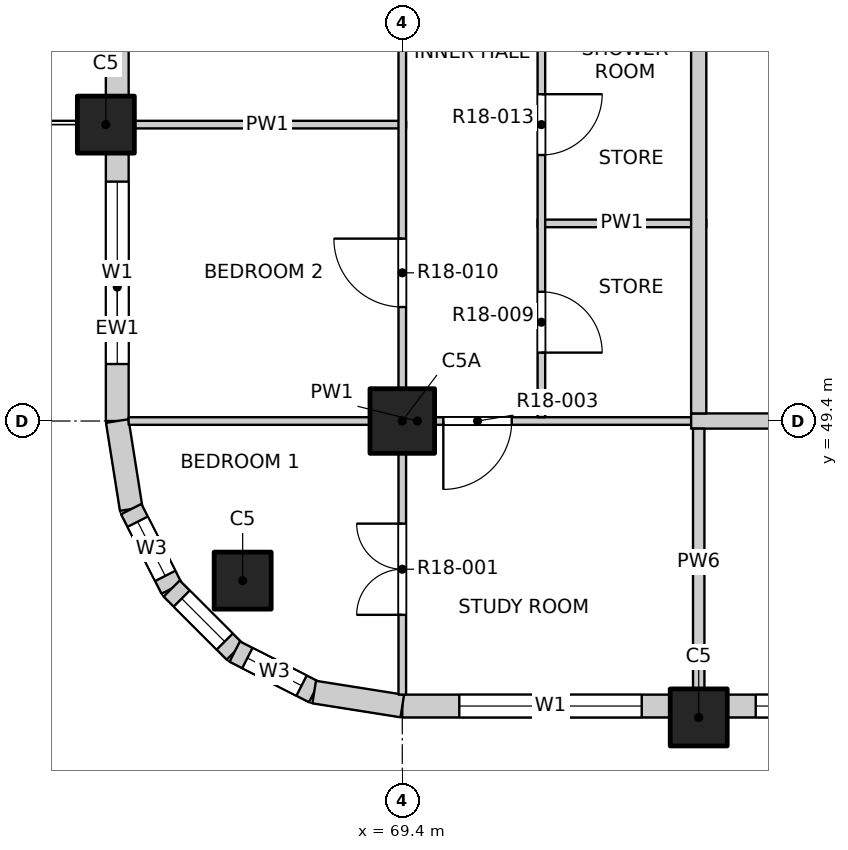
"""IFC4 building model, lengths in metres.
Left out: names, types, materials, properties, quantities, classifications, styles, units other than length and angle.
Written with IfcOpenShell. Run it as: python <this file> out.ifc"""

import sys

from ifc_helpers import new_model, si_unit, direction, frame, frame_2d, origin, origin_2d, place, context, subcontext, project, spatial, rectangle, extrude, element, fill, save


model = new_model("IFC4")
c1 = context("Model", 3, precision=1e-05, world=origin(), true_north=direction((0.0, 1.0)))
c2 = subcontext(c1, "Body", "Model", "MODEL_VIEW")
j1 = project(units=[si_unit("LENGTHUNIT", "METRE"), si_unit("PLANEANGLEUNIT", "RADIAN")], contexts=[c1])
p1 = place(None, origin())
s1 = spatial("IfcSite", under=j1, at=p1, CompositionType="ELEMENT")
p2 = place(p1, origin())
s2 = spatial("IfcBuilding", under=s1, at=p2, CompositionType="ELEMENT")
p3 = place(p2, frame((0.0, 0.0, 189.4)))
s3 = spatial("IfcBuildingStorey", under=s2, at=p3, CompositionType="ELEMENT", Elevation=189.4)
for number, where, z_axis, x_axis in (
    (1, (67.3, 47.3, -0.25), (0.0, 0.0, 1.0), (1.0, 0.0, 0.0)),
    (2, (65.5, 53.3, -0.25), (0.0, 0.0, 1.0), (1.0, 0.0, 0.0)),
    (3, (73.3, 45.5, -0.25), (0.0, 0.0, 1.0), (1.0, 0.0, 0.0)),
):
    element("IfcColumn", number, at=place(p3, frame(where, z_axis=z_axis, x_axis=x_axis)), inside=s3, PredefinedType="COLUMN", context=c2, shape_type="SweptSolid", body=[
        extrude(rectangle(XDim=0.75, YDim=0.75, at=origin_2d()), origin(), (0.0, 0.0, 1.0), 3.35),
    ])
p4 = place(p3, frame((69.4, 49.4, -0.25), z_axis=(0.0, 0.0, 1.0), x_axis=(1.0, 0.0, 0.0)))
e4 = element("IfcColumn", 4, at=p4, inside=s3, PredefinedType="COLUMN", context=c2, shape_type="SweptSolid", body=[
    extrude(rectangle(XDim=0.85, YDim=0.85, at=origin_2d()), origin(), (0.0, 0.0, 1.0), 3.35),
])
p5 = place(p3, frame((69.4, 45.65, 0.0), z_axis=(0.0, 0.0, 1.0), x_axis=(1.0, 0.0, 0.0)))
e5 = element("IfcWall", 5, at=p5, inside=s3, PredefinedType="SOLIDWALL", context=c2, shape_type="SweptSolid", body=[
    extrude(rectangle(XDim=3.525, YDim=0.3, at=frame_2d((1.763, 0.0))), origin(), (0.0, 0.0, 1.0), 3.1),
])
p6 = place(p5, frame((0.75, 0.0, 0.9)))
e6 = element("IfcOpeningElement", 6, at=p6, cuts=e5, PredefinedType="OPENING", context=c2, shape_type="SweptSolid", body=[
    extrude(rectangle(XDim=2.4, YDim=1.8, at=frame_2d((1.2, 0.9))), frame((0.0, 0.16, 0.0), z_axis=(0.0, -1.0, 0.0), x_axis=(1.0, 0.0, 0.0)), (0.0, 0.0, 1.0), 0.32),
])
p7 = place(p3, frame((73.675, 45.65, 0.0), z_axis=(0.0, 0.0, 1.0), x_axis=(1.0, 0.0, 0.0)))
e7 = element("IfcWall", 7, at=p7, inside=s3, PredefinedType="SOLIDWALL", context=c2, shape_type="SweptSolid", body=[
    extrude(rectangle(XDim=7.05, YDim=0.3, at=frame_2d((3.525, 0.0))), origin(), (0.0, 0.0, 1.0), 3.1),
])
p8 = place(p7, frame((0.375, 0.0, 0.9)))
e8 = element("IfcOpeningElement", 8, at=p8, cuts=e7, PredefinedType="OPENING", context=c2, shape_type="SweptSolid", body=[
    extrude(rectangle(XDim=2.4, YDim=1.8, at=frame_2d((1.2, 0.9))), frame((0.0, 0.16, 0.0), z_axis=(0.0, -1.0, 0.0), x_axis=(1.0, 0.0, 0.0)), (0.0, 0.0, 1.0), 0.32),
])
p9 = place(p7, frame((4.275, 0.0, 0.9)))
e9 = element("IfcOpeningElement", 9, at=p9, cuts=e7, PredefinedType="OPENING", context=c2, shape_type="SweptSolid", body=[
    extrude(rectangle(XDim=2.4, YDim=1.8, at=frame_2d((1.2, 0.9))), frame((0.0, 0.16, 0.0), z_axis=(0.0, -1.0, 0.0), x_axis=(1.0, 0.0, 0.0)), (0.0, 0.0, 1.0), 0.32),
])
p10 = place(p3, frame((65.65, 49.4, 0.0), z_axis=(0.0, 0.0, 1.0), x_axis=(0.0, 1.0, 0.0)))
e10 = element("IfcWall", 10, at=p10, inside=s3, PredefinedType="SOLIDWALL", context=c2, shape_type="SweptSolid", body=[
    extrude(rectangle(XDim=3.525, YDim=0.3, at=frame_2d((1.763, 0.0))), origin(), (0.0, 0.0, 1.0), 3.1),
])
p11 = place(p10, frame((0.75, 0.0, 0.9)))
e11 = element("IfcOpeningElement", 11, at=p11, cuts=e10, PredefinedType="OPENING", context=c2, shape_type="SweptSolid", body=[
    extrude(rectangle(XDim=2.4, YDim=1.8, at=frame_2d((1.2, 0.9))), frame((0.0, 0.16, 0.0), z_axis=(0.0, -1.0, 0.0), x_axis=(1.0, 0.0, 0.0)), (0.0, 0.0, 1.0), 0.32),
])
p12 = place(p3, frame((65.65, 53.675, 0.0), z_axis=(0.0, 0.0, 1.0), x_axis=(0.0, 1.0, 0.0)))
e12 = element("IfcWall", 12, at=p12, inside=s3, PredefinedType="SOLIDWALL", context=c2, shape_type="SweptSolid", body=[
    extrude(rectangle(XDim=7.05, YDim=0.3, at=frame_2d((3.525, 0.0))), origin(), (0.0, 0.0, 1.0), 3.1),
])
p13 = place(p12, frame((0.675, 0.0, 0.0)))
e13 = element("IfcOpeningElement", 13, at=p13, cuts=e12, PredefinedType="OPENING", context=c2, shape_type="SweptSolid", body=[
    extrude(rectangle(XDim=1.8, YDim=2.4, at=frame_2d((0.9, 1.2))), frame((0.0, 0.16, 0.0), z_axis=(0.0, -1.0, 0.0), x_axis=(1.0, 0.0, 0.0)), (0.0, 0.0, 1.0), 0.32),
])
p14 = place(p12, frame((4.275, 0.0, 0.9)))
e14 = element("IfcOpeningElement", 14, at=p14, cuts=e12, PredefinedType="OPENING", context=c2, shape_type="SweptSolid", body=[
    extrude(rectangle(XDim=2.4, YDim=1.8, at=frame_2d((1.2, 0.9))), frame((0.0, 0.16, 0.0), z_axis=(0.0, -1.0, 0.0), x_axis=(1.0, 0.0, 0.0)), (0.0, 0.0, 1.0), 0.32),
])
p15 = place(p3, frame((65.65, 49.4, 0.0), z_axis=(0.0, 0.0, 1.0), x_axis=(0.156496880861, -0.987678452879, 0.0)))
e15 = element("IfcWall", 15, at=p15, inside=s3, PredefinedType="SOLIDWALL", context=c2, shape_type="SweptSolid", body=[
    extrude(rectangle(XDim=1.173, YDim=0.3, at=frame_2d((0.586, 0.0))), origin(), (0.0, 0.0, 1.0), 3.1),
])
p16 = place(p3, frame((65.833, 48.241, 0.0), z_axis=(0.0, 0.0, 1.0), x_axis=(0.454025524128, -0.890988677504, 0.0)))
e16 = element("IfcWall", 16, at=p16, inside=s3, PredefinedType="SOLIDWALL", context=c2, shape_type="SweptSolid", body=[
    extrude(rectangle(XDim=1.173, YDim=0.3, at=frame_2d((0.587, 0.0))), origin(), (0.0, 0.0, 1.0), 3.1),
])
p17 = place(p16, frame((0.187, 0.0, 0.9)))
e17 = element("IfcOpeningElement", 17, at=p17, cuts=e16, PredefinedType="OPENING", context=c2, shape_type="SweptSolid", body=[
    extrude(rectangle(XDim=0.8, YDim=1.2, at=frame_2d((0.4, 0.6))), frame((0.0, 0.16, 0.0), z_axis=(0.0, -1.0, 0.0), x_axis=(1.0, 0.0, 0.0)), (0.0, 0.0, 1.0), 0.32),
])
p18 = place(p3, frame((66.366, 47.196, 0.0), z_axis=(0.0, 0.0, 1.0), x_axis=(0.707106781187, -0.707106781187, 0.0)))
e18 = element("IfcWall", 18, at=p18, inside=s3, PredefinedType="SOLIDWALL", context=c2, shape_type="SweptSolid", body=[
    extrude(rectangle(XDim=1.173, YDim=0.3, at=frame_2d((0.586, 0.0))), origin(), (0.0, 0.0, 1.0), 3.1),
])
p19 = place(p18, frame((0.187, 0.0, 0.9)))
e19 = element("IfcOpeningElement", 19, at=p19, cuts=e18, PredefinedType="OPENING", context=c2, shape_type="SweptSolid", body=[
    extrude(rectangle(XDim=0.8, YDim=1.2, at=frame_2d((0.4, 0.6))), frame((0.0, 0.16, 0.0), z_axis=(0.0, -1.0, 0.0), x_axis=(1.0, 0.0, 0.0)), (0.0, 0.0, 1.0), 0.32),
])
p20 = place(p3, frame((67.196, 46.366, 0.0), z_axis=(0.0, 0.0, 1.0), x_axis=(0.890988677504, -0.454025524128, 0.0)))
e20 = element("IfcWall", 20, at=p20, inside=s3, PredefinedType="SOLIDWALL", context=c2, shape_type="SweptSolid", body=[
    extrude(rectangle(XDim=1.173, YDim=0.3, at=frame_2d((0.587, 0.0))), origin(), (0.0, 0.0, 1.0), 3.1),
])
p21 = place(p20, frame((0.187, 0.0, 0.9)))
e21 = element("IfcOpeningElement", 21, at=p21, cuts=e20, PredefinedType="OPENING", context=c2, shape_type="SweptSolid", body=[
    extrude(rectangle(XDim=0.8, YDim=1.2, at=frame_2d((0.4, 0.6))), frame((0.0, 0.16, 0.0), z_axis=(0.0, -1.0, 0.0), x_axis=(1.0, 0.0, 0.0)), (0.0, 0.0, 1.0), 0.32),
])
p22 = place(p3, frame((68.241, 45.833, 0.0), z_axis=(0.0, 0.0, 1.0), x_axis=(0.987678452879, -0.156496880861, 0.0)))
e22 = element("IfcWall", 22, at=p22, inside=s3, PredefinedType="SOLIDWALL", context=c2, shape_type="SweptSolid", body=[
    extrude(rectangle(XDim=1.173, YDim=0.3, at=frame_2d((0.586, 0.0))), origin(), (0.0, 0.0, 1.0), 3.1),
])
p23 = place(p3, frame((65.8, 49.4, 0.0), z_axis=(0.0, 0.0, 1.0), x_axis=(1.0, 0.0, 0.0)))
e23 = element("IfcWall", 23, at=p23, inside=s3, PredefinedType="PARTITIONING", context=c2, shape_type="SweptSolid", body=[
    extrude(rectangle(XDim=7.6, YDim=0.1, at=frame_2d((3.8, 0.0))), origin(), (0.0, 0.0, 1.0), 3.1),
])
p24 = place(p23, frame((4.14, 0.0, 0.0)))
e24 = element("IfcOpeningElement", 24, at=p24, cuts=e23, PredefinedType="OPENING", context=c2, shape_type="SweptSolid", body=[
    extrude(rectangle(XDim=0.9, YDim=2.1, at=frame_2d((0.45, 1.05))), frame((0.0, 0.06, 0.0), z_axis=(0.0, -1.0, 0.0), x_axis=(1.0, 0.0, 0.0)), (0.0, 0.0, 1.0), 0.12),
])
p25 = place(p3, frame((73.2, 49.4, 0.0), z_axis=(0.0, 0.0, 1.0), x_axis=(1.0, 0.0, 0.0)))
e25 = element("IfcWall", 25, at=p25, inside=s3, PredefinedType="PARTITIONING", context=c2, shape_type="SweptSolid", body=[
    extrude(rectangle(XDim=23.6, YDim=0.2, at=frame_2d((11.8, 0.0))), origin(), (0.0, 0.0, 1.0), 3.1),
])
p26 = place(p25, frame((4.525, 0.0, 0.0)))
e26 = element("IfcOpeningElement", 26, at=p26, cuts=e25, PredefinedType="OPENING", context=c2, shape_type="SweptSolid", body=[
    extrude(rectangle(XDim=1.2, YDim=2.1, at=frame_2d((0.6, 1.05))), frame((0.0, 0.11, 0.0), z_axis=(0.0, -1.0, 0.0), x_axis=(1.0, 0.0, 0.0)), (0.0, 0.0, 1.0), 0.22),
])
p27 = place(p25, frame((12.325, 0.0, 0.0)))
e27 = element("IfcOpeningElement", 27, at=p27, cuts=e25, PredefinedType="OPENING", context=c2, shape_type="SweptSolid", body=[
    extrude(rectangle(XDim=1.2, YDim=2.1, at=frame_2d((0.6, 1.05))), frame((0.0, 0.11, 0.0), z_axis=(0.0, -1.0, 0.0), x_axis=(1.0, 0.0, 0.0)), (0.0, 0.0, 1.0), 0.22),
])
p28 = place(p25, frame((20.125, 0.0, 0.0)))
e28 = element("IfcOpeningElement", 28, at=p28, cuts=e25, PredefinedType="OPENING", context=c2, shape_type="SweptSolid", body=[
    extrude(rectangle(XDim=1.2, YDim=2.1, at=frame_2d((0.6, 1.05))), frame((0.0, 0.11, 0.0), z_axis=(0.0, -1.0, 0.0), x_axis=(1.0, 0.0, 0.0)), (0.0, 0.0, 1.0), 0.22),
])
p29 = place(p3, frame((71.18, 52.0, 0.0), z_axis=(0.0, 0.0, 1.0), x_axis=(1.0, 0.0, 0.0)))
e29 = element("IfcWall", 29, at=p29, inside=s3, PredefinedType="PARTITIONING", context=c2, shape_type="SweptSolid", body=[
    extrude(rectangle(XDim=2.22, YDim=0.1, at=frame_2d((1.11, 0.0))), origin(), (0.0, 0.0, 1.0), 3.1),
])
p30 = place(p3, frame((65.8, 53.3, 0.0), z_axis=(0.0, 0.0, 1.0), x_axis=(1.0, 0.0, 0.0)))
e30 = element("IfcWall", 30, at=p30, inside=s3, PredefinedType="PARTITIONING", context=c2, shape_type="SweptSolid", body=[
    extrude(rectangle(XDim=3.65, YDim=0.1, at=frame_2d((1.825, 0.0))), origin(), (0.0, 0.0, 1.0), 3.1),
])
p31 = place(p3, frame((69.4, 45.8, 0.0), z_axis=(0.0, 0.0, 1.0), x_axis=(0.0, 1.0, 0.0)))
e31 = element("IfcWall", 31, at=p31, inside=s3, PredefinedType="PARTITIONING", context=c2, shape_type="SweptSolid", body=[
    extrude(rectangle(XDim=38.4, YDim=0.1, at=frame_2d((19.2, 0.0))), origin(), (0.0, 0.0, 1.0), 3.1),
])
p32 = place(p31, frame((1.05, 0.0, 0.0)))
e32 = element("IfcOpeningElement", 32, at=p32, cuts=e31, PredefinedType="OPENING", context=c2, shape_type="SweptSolid", body=[
    extrude(rectangle(XDim=1.2, YDim=2.1, at=frame_2d((0.6, 1.05))), frame((0.0, 0.06, 0.0), z_axis=(0.0, -1.0, 0.0), x_axis=(1.0, 0.0, 0.0)), (0.0, 0.0, 1.0), 0.12),
])
p33 = place(p31, frame((5.1, 0.0, 0.0)))
e33 = element("IfcOpeningElement", 33, at=p33, cuts=e31, PredefinedType="OPENING", context=c2, shape_type="SweptSolid", body=[
    extrude(rectangle(XDim=0.9, YDim=2.1, at=frame_2d((0.45, 1.05))), frame((0.0, 0.06, 0.0), z_axis=(0.0, -1.0, 0.0), x_axis=(1.0, 0.0, 0.0)), (0.0, 0.0, 1.0), 0.12),
])
p34 = place(p31, frame((9.0, 0.0, 0.0)))
e34 = element("IfcOpeningElement", 34, at=p34, cuts=e31, PredefinedType="OPENING", context=c2, shape_type="SweptSolid", body=[
    extrude(rectangle(XDim=0.9, YDim=2.1, at=frame_2d((0.45, 1.05))), frame((0.0, 0.06, 0.0), z_axis=(0.0, -1.0, 0.0), x_axis=(1.0, 0.0, 0.0)), (0.0, 0.0, 1.0), 0.12),
])
p35 = place(p31, frame((12.9, 0.0, 0.0)))
e35 = element("IfcOpeningElement", 35, at=p35, cuts=e31, PredefinedType="OPENING", context=c2, shape_type="SweptSolid", body=[
    extrude(rectangle(XDim=0.9, YDim=2.1, at=frame_2d((0.45, 1.05))), frame((0.0, 0.06, 0.0), z_axis=(0.0, -1.0, 0.0), x_axis=(1.0, 0.0, 0.0)), (0.0, 0.0, 1.0), 0.12),
])
p36 = place(p31, frame((16.8, 0.0, 0.0)))
e36 = element("IfcOpeningElement", 36, at=p36, cuts=e31, PredefinedType="OPENING", context=c2, shape_type="SweptSolid", body=[
    extrude(rectangle(XDim=0.9, YDim=2.1, at=frame_2d((0.45, 1.05))), frame((0.0, 0.06, 0.0), z_axis=(0.0, -1.0, 0.0), x_axis=(1.0, 0.0, 0.0)), (0.0, 0.0, 1.0), 0.12),
])
p37 = place(p31, frame((20.7, 0.0, 0.0)))
e37 = element("IfcOpeningElement", 37, at=p37, cuts=e31, PredefinedType="OPENING", context=c2, shape_type="SweptSolid", body=[
    extrude(rectangle(XDim=0.9, YDim=2.1, at=frame_2d((0.45, 1.05))), frame((0.0, 0.06, 0.0), z_axis=(0.0, -1.0, 0.0), x_axis=(1.0, 0.0, 0.0)), (0.0, 0.0, 1.0), 0.12),
])
p38 = place(p31, frame((24.6, 0.0, 0.0)))
e38 = element("IfcOpeningElement", 38, at=p38, cuts=e31, PredefinedType="OPENING", context=c2, shape_type="SweptSolid", body=[
    extrude(rectangle(XDim=0.9, YDim=2.1, at=frame_2d((0.45, 1.05))), frame((0.0, 0.06, 0.0), z_axis=(0.0, -1.0, 0.0), x_axis=(1.0, 0.0, 0.0)), (0.0, 0.0, 1.0), 0.12),
])
p39 = place(p31, frame((28.5, 0.0, 0.0)))
e39 = element("IfcOpeningElement", 39, at=p39, cuts=e31, PredefinedType="OPENING", context=c2, shape_type="SweptSolid", body=[
    extrude(rectangle(XDim=0.9, YDim=2.1, at=frame_2d((0.45, 1.05))), frame((0.0, 0.06, 0.0), z_axis=(0.0, -1.0, 0.0), x_axis=(1.0, 0.0, 0.0)), (0.0, 0.0, 1.0), 0.12),
])
p40 = place(p31, frame((32.4, 0.0, 0.0)))
e40 = element("IfcOpeningElement", 40, at=p40, cuts=e31, PredefinedType="OPENING", context=c2, shape_type="SweptSolid", body=[
    extrude(rectangle(XDim=0.9, YDim=2.1, at=frame_2d((0.45, 1.05))), frame((0.0, 0.06, 0.0), z_axis=(0.0, -1.0, 0.0), x_axis=(1.0, 0.0, 0.0)), (0.0, 0.0, 1.0), 0.12),
])
p41 = place(p31, frame((36.15, 0.0, 0.0)))
e41 = element("IfcOpeningElement", 41, at=p41, cuts=e31, PredefinedType="OPENING", context=c2, shape_type="SweptSolid", body=[
    extrude(rectangle(XDim=1.2, YDim=2.1, at=frame_2d((0.6, 1.05))), frame((0.0, 0.06, 0.0), z_axis=(0.0, -1.0, 0.0), x_axis=(1.0, 0.0, 0.0)), (0.0, 0.0, 1.0), 0.12),
])
p42 = place(p3, frame((71.23, 49.45, 0.0), z_axis=(0.0, 0.0, 1.0), x_axis=(0.0, 1.0, 0.0)))
e42 = element("IfcWall", 42, at=p42, inside=s3, PredefinedType="PARTITIONING", context=c2, shape_type="SweptSolid", body=[
    extrude(rectangle(XDim=12.55, YDim=0.1, at=frame_2d((6.275, 0.0))), origin(), (0.0, 0.0, 1.0), 3.1),
])
p43 = place(p42, frame((0.85, 0.0, 0.0)))
e43 = element("IfcOpeningElement", 43, at=p43, cuts=e42, PredefinedType="OPENING", context=c2, shape_type="SweptSolid", body=[
    extrude(rectangle(XDim=0.8, YDim=2.1, at=frame_2d((0.4, 1.05))), frame((0.0, 0.06, 0.0), z_axis=(0.0, -1.0, 0.0), x_axis=(1.0, 0.0, 0.0)), (0.0, 0.0, 1.0), 0.12),
])
p44 = place(p42, frame((3.45, 0.0, 0.0)))
e44 = element("IfcOpeningElement", 44, at=p44, cuts=e42, PredefinedType="OPENING", context=c2, shape_type="SweptSolid", body=[
    extrude(rectangle(XDim=0.8, YDim=2.1, at=frame_2d((0.4, 1.05))), frame((0.0, 0.06, 0.0), z_axis=(0.0, -1.0, 0.0), x_axis=(1.0, 0.0, 0.0)), (0.0, 0.0, 1.0), 0.12),
])
p45 = place(p42, frame((5.615, 0.0, 0.0)))
e45 = element("IfcOpeningElement", 45, at=p45, cuts=e42, PredefinedType="OPENING", context=c2, shape_type="SweptSolid", body=[
    extrude(rectangle(XDim=0.9, YDim=2.1, at=frame_2d((0.45, 1.05))), frame((0.0, 0.06, 0.0), z_axis=(0.0, -1.0, 0.0), x_axis=(1.0, 0.0, 0.0)), (0.0, 0.0, 1.0), 0.12),
])
p46 = place(p42, frame((7.73, 0.0, 0.0)))
e46 = element("IfcOpeningElement", 46, at=p46, cuts=e42, PredefinedType="OPENING", context=c2, shape_type="SweptSolid", body=[
    extrude(rectangle(XDim=0.9, YDim=2.1, at=frame_2d((0.45, 1.05))), frame((0.0, 0.06, 0.0), z_axis=(0.0, -1.0, 0.0), x_axis=(1.0, 0.0, 0.0)), (0.0, 0.0, 1.0), 0.12),
])
p47 = place(p42, frame((10.54, 0.0, 0.0)))
e47 = element("IfcOpeningElement", 47, at=p47, cuts=e42, PredefinedType="OPENING", context=c2, shape_type="SweptSolid", body=[
    extrude(rectangle(XDim=0.9, YDim=2.1, at=frame_2d((0.45, 1.05))), frame((0.0, 0.06, 0.0), z_axis=(0.0, -1.0, 0.0), x_axis=(1.0, 0.0, 0.0)), (0.0, 0.0, 1.0), 0.12),
])
p48 = place(p3, frame((73.3, 45.8, 0.0), z_axis=(0.0, 0.0, 1.0), x_axis=(0.0, 1.0, 0.0)))
e48 = element("IfcWall", 48, at=p48, inside=s3, PredefinedType="PARTITIONING", context=c2, shape_type="SweptSolid", body=[
    extrude(rectangle(XDim=3.5, YDim=0.15, at=frame_2d((1.75, 0.0))), origin(), (0.0, 0.0, 1.0), 3.1),
])
p49 = place(p3, frame((73.3, 49.5, 0.0), z_axis=(0.0, 0.0, 1.0), x_axis=(0.0, 1.0, 0.0)))
e49 = element("IfcWall", 49, at=p49, inside=s3, PredefinedType="PARTITIONING", context=c2, shape_type="SweptSolid", body=[
    extrude(rectangle(XDim=34.7, YDim=0.2, at=frame_2d((17.35, 0.0))), origin(), (0.0, 0.0, 1.0), 3.1),
])
p50 = place(p49, frame((13.825, 0.0, 0.0)))
e50 = element("IfcOpeningElement", 50, at=p50, cuts=e49, PredefinedType="OPENING", context=c2, shape_type="SweptSolid", body=[
    extrude(rectangle(XDim=1.0, YDim=2.1, at=frame_2d((0.5, 1.05))), frame((0.0, 0.11, 0.0), z_axis=(0.0, -1.0, 0.0), x_axis=(1.0, 0.0, 0.0)), (0.0, 0.0, 1.0), 0.22),
])
p51 = place(p49, frame((21.975, 0.0, 0.0)))
e51 = element("IfcOpeningElement", 51, at=p51, cuts=e49, PredefinedType="OPENING", context=c2, shape_type="SweptSolid", body=[
    extrude(rectangle(XDim=1.0, YDim=2.1, at=frame_2d((0.5, 1.05))), frame((0.0, 0.11, 0.0), z_axis=(0.0, -1.0, 0.0), x_axis=(1.0, 0.0, 0.0)), (0.0, 0.0, 1.0), 0.22),
])
p52 = place(p6, origin())
e52 = element("IfcWindow", 52, at=p52, inside=s3, PartitioningType="DOUBLE_PANEL_VERTICAL", PredefinedType="WINDOW", context=c2, shape_type="SweptSolid", body=[
    extrude(rectangle(XDim=2.4, YDim=1.8, at=frame_2d((1.2, 0.9))), frame((0.0, 0.03, 0.0), z_axis=(0.0, -1.0, 0.0), x_axis=(1.0, 0.0, 0.0)), (0.0, 0.0, 1.0), 0.06),
])
fill(e6, e52)
p53 = place(p8, origin())
e53 = element("IfcWindow", 53, at=p53, inside=s3, PartitioningType="DOUBLE_PANEL_VERTICAL", PredefinedType="WINDOW", context=c2, shape_type="SweptSolid", body=[
    extrude(rectangle(XDim=2.4, YDim=1.8, at=frame_2d((1.2, 0.9))), frame((0.0, 0.03, 0.0), z_axis=(0.0, -1.0, 0.0), x_axis=(1.0, 0.0, 0.0)), (0.0, 0.0, 1.0), 0.06),
])
fill(e8, e53)
p54 = place(p11, origin())
e54 = element("IfcWindow", 54, at=p54, inside=s3, PartitioningType="DOUBLE_PANEL_VERTICAL", PredefinedType="WINDOW", context=c2, shape_type="SweptSolid", body=[
    extrude(rectangle(XDim=2.4, YDim=1.8, at=frame_2d((1.2, 0.9))), frame((0.0, 0.03, 0.0), z_axis=(0.0, -1.0, 0.0), x_axis=(1.0, 0.0, 0.0)), (0.0, 0.0, 1.0), 0.06),
])
fill(e11, e54)
p55 = place(p17, origin())
e55 = element("IfcWindow", 55, at=p55, inside=s3, PartitioningType="SINGLE_PANEL", PredefinedType="WINDOW", context=c2, shape_type="SweptSolid", body=[
    extrude(rectangle(XDim=0.8, YDim=1.2, at=frame_2d((0.4, 0.6))), frame((0.0, 0.03, 0.0), z_axis=(0.0, -1.0, 0.0), x_axis=(1.0, 0.0, 0.0)), (0.0, 0.0, 1.0), 0.06),
])
fill(e17, e55)
p56 = place(p19, origin())
e56 = element("IfcWindow", 56, at=p56, inside=s3, PartitioningType="SINGLE_PANEL", PredefinedType="WINDOW", context=c2, shape_type="SweptSolid", body=[
    extrude(rectangle(XDim=0.8, YDim=1.2, at=frame_2d((0.4, 0.6))), frame((0.0, 0.03, 0.0), z_axis=(0.0, -1.0, 0.0), x_axis=(1.0, 0.0, 0.0)), (0.0, 0.0, 1.0), 0.06),
])
fill(e19, e56)
p57 = place(p21, origin())
e57 = element("IfcWindow", 57, at=p57, inside=s3, PartitioningType="SINGLE_PANEL", PredefinedType="WINDOW", context=c2, shape_type="SweptSolid", body=[
    extrude(rectangle(XDim=0.8, YDim=1.2, at=frame_2d((0.4, 0.6))), frame((0.0, 0.03, 0.0), z_axis=(0.0, -1.0, 0.0), x_axis=(1.0, 0.0, 0.0)), (0.0, 0.0, 1.0), 0.06),
])
fill(e21, e57)
p58 = place(p32, origin())
e58 = element("IfcDoor", 58, at=p58, inside=s3, OperationType="DOUBLE_DOOR_SINGLE_SWING", PredefinedType="DOOR", context=c2, shape_type="SweptSolid", body=[
    extrude(rectangle(XDim=1.2, YDim=2.1, at=frame_2d((0.6, 1.05))), frame((0.0, 0.025, 0.0), z_axis=(0.0, -1.0, 0.0), x_axis=(1.0, 0.0, 0.0)), (0.0, 0.0, 1.0), 0.05),
])
fill(e32, e58)
p59 = place(p24, origin())
e59 = element("IfcDoor", 59, at=p59, inside=s3, OperationType="SINGLE_SWING_RIGHT", PredefinedType="DOOR", context=c2, shape_type="SweptSolid", body=[
    extrude(rectangle(XDim=0.9, YDim=2.1, at=frame_2d((0.45, 1.05))), frame((0.0, 0.025, 0.0), z_axis=(0.0, -1.0, 0.0), x_axis=(1.0, 0.0, 0.0)), (0.0, 0.0, 1.0), 0.05),
])
fill(e24, e59)
p60 = place(p43, origin())
e60 = element("IfcDoor", 60, at=p60, inside=s3, OperationType="SINGLE_SWING_RIGHT", PredefinedType="DOOR", context=c2, shape_type="SweptSolid", body=[
    extrude(rectangle(XDim=0.8, YDim=2.1, at=frame_2d((0.4, 1.05))), frame((0.0, 0.025, 0.0), z_axis=(0.0, -1.0, 0.0), x_axis=(1.0, 0.0, 0.0)), (0.0, 0.0, 1.0), 0.05),
])
fill(e43, e60)
p61 = place(p33, origin())
e61 = element("IfcDoor", 61, at=p61, inside=s3, OperationType="SINGLE_SWING_RIGHT", PredefinedType="DOOR", context=c2, shape_type="SweptSolid", body=[
    extrude(rectangle(XDim=0.9, YDim=2.1, at=frame_2d((0.45, 1.05))), frame((0.0, 0.025, 0.0), z_axis=(0.0, -1.0, 0.0), x_axis=(1.0, 0.0, 0.0)), (0.0, 0.0, 1.0), 0.05),
])
fill(e33, e61)
p62 = place(p44, origin())
e62 = element("IfcDoor", 62, at=p62, inside=s3, OperationType="SINGLE_SWING_LEFT", PredefinedType="DOOR", context=c2, shape_type="SweptSolid", body=[
    extrude(rectangle(XDim=0.8, YDim=2.1, at=frame_2d((0.4, 1.05))), frame((0.0, 0.025, 0.0), z_axis=(0.0, -1.0, 0.0), x_axis=(1.0, 0.0, 0.0)), (0.0, 0.0, 1.0), 0.05),
])
fill(e44, e62)
save(model, sys.argv[1])
